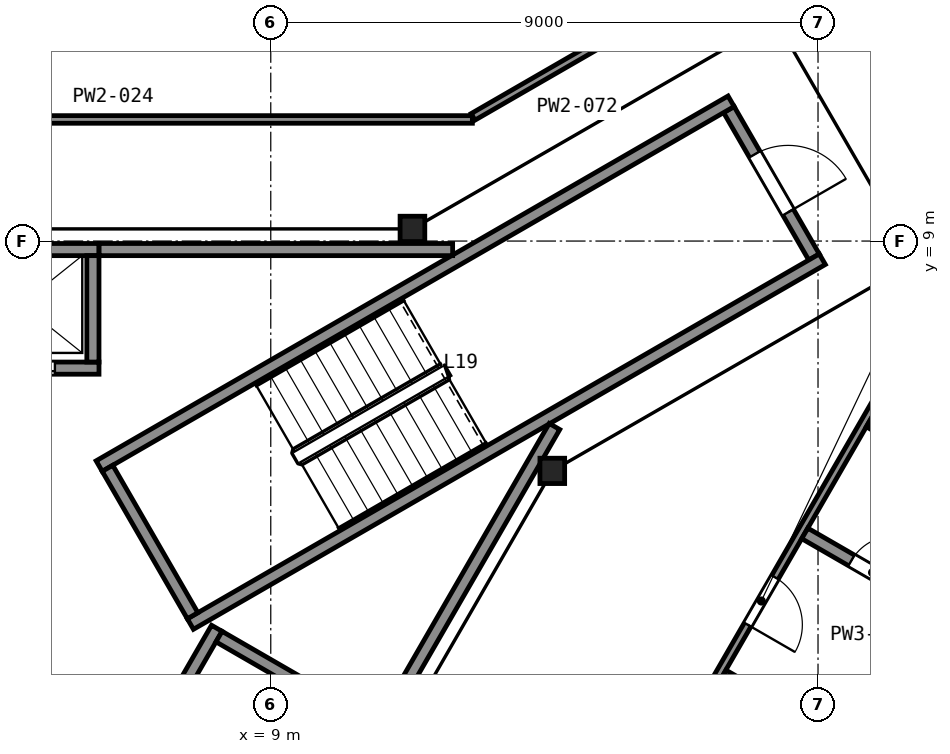
"""IFC4 building model, lengths in metres.
Left out: names, types, materials, properties, quantities, classifications, styles, units other than length and angle.
Written with IfcOpenShell. Run it as: python <this file> out.ifc"""

import sys

from ifc_helpers import new_model, si_unit, direction, frame, frame_2d, origin, origin_2d, place, context, subcontext, project, spatial, rectangle, i_section, extrude, element, fill, save


model = new_model("IFC4")
c1 = context("Model", 3, precision=1e-05, world=origin(), true_north=direction((0.0, 1.0)))
c2 = subcontext(c1, "Body", "Model", "MODEL_VIEW")
j1 = project(units=[si_unit("LENGTHUNIT", "METRE"), si_unit("PLANEANGLEUNIT", "RADIAN")], contexts=[c1])
p1 = place(None, origin())
s1 = spatial("IfcSite", under=j1, at=p1, CompositionType="ELEMENT")
p2 = place(p1, origin())
s2 = spatial("IfcBuilding", under=s1, at=p2, CompositionType="ELEMENT")
p3 = place(p2, frame((0.0, 0.0, 83.6)))
s3 = spatial("IfcBuildingStorey", under=s2, at=p3, CompositionType="ELEMENT", Elevation=83.6)
for number, where, z_axis, x_axis in (
    (1, (13.63, 5.22, 0.0), (0.0, 0.0, 1.0), (1.0, 0.0, 0.0)),
    (2, (11.33, 9.2, 0.0), (0.0, 0.0, 1.0), (1.0, 0.0, 0.0)),
):
    element("IfcColumn", number, at=place(p3, frame(where, z_axis=z_axis, x_axis=x_axis)), inside=s3, PredefinedType="COLUMN", context=c2, shape_type="SweptSolid", body=[
        extrude(i_section(OverallWidth=0.406, OverallDepth=0.417, WebThickness=0.03, FlangeThickness=0.048, FilletRadius=0.015, at=origin_2d()), origin(), (0.0, 0.0, 1.0), 3.6),
    ])
p4 = place(p3, frame((17.934, 8.738, 0.0), z_axis=(0.0, 0.0, 1.0), x_axis=(-0.49998411664, 0.866034573852, 0.0)))
e3 = element("IfcWall", 3, at=p4, inside=s3, PredefinedType="PARTITIONING", context=c2, shape_type="SweptSolid", body=[
    extrude(rectangle(XDim=2.8, YDim=0.2, at=frame_2d((1.4, 0.0))), origin(), (0.0, 0.0, 1.0), 3.35),
])
p5 = place(p4, frame((0.85, 0.0, 0.0)))
e4 = element("IfcOpeningElement", 4, at=p5, cuts=e3, PredefinedType="OPENING", context=c2, shape_type="SweptSolid", body=[
    extrude(rectangle(XDim=1.1, YDim=2.1, at=frame_2d((0.55, 1.05))), frame((0.0, 0.11, 0.0), z_axis=(0.0, -1.0, 0.0), x_axis=(1.0, 0.0, 0.0)), (0.0, 0.0, 1.0), 0.22),
])
for number, where, z_axis, x_axis in (
    (5, (6.178, 5.299, 0.0), (0.0, 0.0, 1.0), (0.866, 0.5, 0.0)),
    (6, (7.678, 2.701, 0.0), (0.0, 0.0, 1.0), (0.866, 0.5, 0.0)),
):
    element("IfcWall", number, at=place(p3, frame(where, z_axis=z_axis, x_axis=x_axis)), inside=s3, PredefinedType="PARTITIONING", context=c2, shape_type="SweptSolid", body=[
        extrude(rectangle(XDim=12.0, YDim=0.2, at=frame_2d((6.0, 0.0))), origin(), (0.0, 0.0, 1.0), 3.35),
    ])
p6 = place(p3, frame((7.715, 2.838, 0.0), z_axis=(0.0, 0.0, 1.0), x_axis=(-0.500049511043, 0.865996816683, 0.0)))
e7 = element("IfcWall", 7, at=p6, inside=s3, PredefinedType="PARTITIONING", context=c2, shape_type="SweptSolid", body=[
    extrude(rectangle(XDim=2.8, YDim=0.2, at=frame_2d((1.4, 0.0))), origin(), (0.0, 0.0, 1.0), 3.35),
])
p7 = place(p3, frame((3.625, 6.91, 0.0), z_axis=(0.0, 0.0, 1.0), x_axis=(1.0, 0.0, 0.0)))
e8 = element("IfcWall", 8, at=p7, inside=s3, PredefinedType="PARTITIONING", context=c2, shape_type="SweptSolid", body=[
    extrude(rectangle(XDim=2.55, YDim=0.2, at=frame_2d((1.275, 0.0))), origin(), (0.0, 0.0, 1.0), 3.6),
])
p8 = place(p7, frame((0.725, 0.0, 0.0)))
e9 = element("IfcOpeningElement", 9, at=p8, cuts=e8, PredefinedType="OPENING", context=c2, shape_type="SweptSolid", body=[
    extrude(rectangle(XDim=1.1, YDim=2.1, at=frame_2d((0.55, 1.05))), frame((0.0, 0.11, 0.0), z_axis=(0.0, -1.0, 0.0), x_axis=(1.0, 0.0, 0.0)), (0.0, 0.0, 1.0), 0.22),
])
p9 = place(p3, frame((3.625, 8.86, 0.0), z_axis=(0.0, 0.0, 1.0), x_axis=(1.0, 0.0, 0.0)))
e10 = element("IfcWall", 10, at=p9, inside=s3, PredefinedType="PARTITIONING", context=c2, shape_type="SweptSolid", body=[
    extrude(rectangle(XDim=2.55, YDim=0.2, at=frame_2d((1.275, 0.0))), origin(), (0.0, 0.0, 1.0), 3.6),
])
p10 = place(p3, frame((5.663, -1.612, 0.0), z_axis=(0.0, 0.0, 1.0), x_axis=(0.49998122708, 0.866036242063, 0.0)))
e11 = element("IfcWall", 11, at=p10, inside=s3, PredefinedType="PARTITIONING", context=c2, shape_type="SweptSolid", body=[
    extrude(rectangle(XDim=4.9, YDim=0.2, at=frame_2d((2.45, 0.0))), origin(), (0.0, 0.0, 1.0), 3.6),
])
p11 = place(p3, frame((6.075, 7.01, 0.0), z_axis=(0.0, 0.0, 1.0), x_axis=(0.0, 1.0, 0.0)))
e12 = element("IfcWall", 12, at=p11, inside=s3, PredefinedType="PARTITIONING", context=c2, shape_type="SweptSolid", body=[
    extrude(rectangle(XDim=1.75, YDim=0.2, at=frame_2d((0.875, 0.0))), origin(), (0.0, 0.0, 1.0), 3.6),
])
p12 = place(p3, frame((9.665, 1.62, 0.0), z_axis=(0.0, 0.0, 1.0), x_axis=(-0.866002029911, 0.500040482552, 0.0)))
e13 = element("IfcWall", 13, at=p12, inside=s3, PredefinedType="PARTITIONING", context=c2, shape_type="SweptSolid", body=[
    extrude(rectangle(XDim=1.75, YDim=0.2, at=frame_2d((0.875, 0.0))), origin(), (0.0, 0.0, 1.0), 3.6),
])
p13 = place(p3, frame((6.177, 8.86, 0.0), z_axis=(0.0, 0.0, 1.0), x_axis=(1.0, 0.0, 0.0)))
e14 = element("IfcWall", 14, at=p13, inside=s3, PredefinedType="PARTITIONING", context=c2, shape_type="SweptSolid", body=[
    extrude(rectangle(XDim=5.814, YDim=0.2, at=frame_2d((2.907, 0.0))), origin(), (0.0, 0.0, 1.0), 3.35),
])
p14 = place(p3, frame((8.492, -3.012, 0.0), z_axis=(0.0, 0.0, 1.0), x_axis=(0.499972957231, 0.866041016371, 0.0)))
e15 = element("IfcWall", 15, at=p14, inside=s3, PredefinedType="PARTITIONING", context=c2, shape_type="SweptSolid", body=[
    extrude(rectangle(XDim=10.349, YDim=0.2, at=frame_2d((5.174, 0.0))), origin(), (0.0, 0.0, 1.0), 3.35),
])
p15 = place(p3, frame((-12.315, 11.0, 0.0), z_axis=(0.0, 0.0, 1.0), x_axis=(1.0, 0.0, 0.0)))
e16 = element("IfcWall", 16, at=p15, inside=s3, PredefinedType="PARTITIONING", context=c2, shape_type="SweptSolid", body=[
    extrude(rectangle(XDim=24.631, YDim=0.125, at=frame_2d((12.315, 0.0))), origin(), (0.0, 0.0, 1.0), 2.262),
])
p16 = place(p15, frame((11.812, 0.0, 0.0)))
e17 = element("IfcOpeningElement", 17, at=p16, cuts=e16, PredefinedType="OPENING", context=c2, shape_type="SweptSolid", body=[
    extrude(rectangle(XDim=1.0, YDim=2.1, at=frame_2d((0.5, 1.05))), frame((0.0, 0.073, 0.0), z_axis=(0.0, -1.0, 0.0), x_axis=(1.0, 0.0, 0.0)), (0.0, 0.0, 1.0), 0.145),
])
p17 = place(p3, frame((19.456, 7.217, 0.0), z_axis=(0.0, 0.0, 1.0), x_axis=(-0.50002170027, -0.866012874765, 0.0)))
e18 = element("IfcWall", 18, at=p17, inside=s3, PredefinedType="PARTITIONING", context=c2, shape_type="SweptSolid", body=[
    extrude(rectangle(XDim=31.379, YDim=0.125, at=frame_2d((15.69, 0.0))), origin(), (0.0, 0.0, 1.0), 2.262),
])
p18 = place(p17, frame((26.843, 0.0, 0.0)))
e19 = element("IfcOpeningElement", 19, at=p18, cuts=e18, PredefinedType="OPENING", context=c2, shape_type="SweptSolid", body=[
    extrude(rectangle(XDim=1.0, YDim=2.1, at=frame_2d((0.5, 1.05))), frame((0.0, 0.073, 0.0), z_axis=(0.0, -1.0, 0.0), x_axis=(1.0, 0.0, 0.0)), (0.0, 0.0, 1.0), 0.145),
])
p19 = place(p17, frame((24.03, 0.0, 0.0)))
e20 = element("IfcOpeningElement", 20, at=p19, cuts=e18, PredefinedType="OPENING", context=c2, shape_type="SweptSolid", body=[
    extrude(rectangle(XDim=0.9, YDim=2.1, at=frame_2d((0.45, 1.05))), frame((0.0, 0.073, 0.0), z_axis=(0.0, -1.0, 0.0), x_axis=(1.0, 0.0, 0.0)), (0.0, 0.0, 1.0), 0.145),
])
p20 = place(p17, frame((17.159, 0.0, 0.0)))
e21 = element("IfcOpeningElement", 21, at=p20, cuts=e18, PredefinedType="OPENING", context=c2, shape_type="SweptSolid", body=[
    extrude(rectangle(XDim=0.9, YDim=2.1, at=frame_2d((0.45, 1.05))), frame((0.0, 0.073, 0.0), z_axis=(0.0, -1.0, 0.0), x_axis=(1.0, 0.0, 0.0)), (0.0, 0.0, 1.0), 0.145),
])
p21 = place(p17, frame((14.24, 0.0, 0.0)))
e22 = element("IfcOpeningElement", 22, at=p21, cuts=e18, PredefinedType="OPENING", context=c2, shape_type="SweptSolid", body=[
    extrude(rectangle(XDim=0.9, YDim=2.1, at=frame_2d((0.45, 1.05))), frame((0.0, 0.073, 0.0), z_axis=(0.0, -1.0, 0.0), x_axis=(1.0, 0.0, 0.0)), (0.0, 0.0, 1.0), 0.145),
])
p22 = place(p17, frame((6.997, 0.0, 0.0)))
e23 = element("IfcOpeningElement", 23, at=p22, cuts=e18, PredefinedType="OPENING", context=c2, shape_type="SweptSolid", body=[
    extrude(rectangle(XDim=0.9, YDim=2.1, at=frame_2d((0.45, 1.05))), frame((0.0, 0.073, 0.0), z_axis=(0.0, -1.0, 0.0), x_axis=(1.0, 0.0, 0.0)), (0.0, 0.0, 1.0), 0.145),
])
p23 = place(p17, frame((4.327, 0.0, 0.0)))
e24 = element("IfcOpeningElement", 24, at=p23, cuts=e18, PredefinedType="OPENING", context=c2, shape_type="SweptSolid", body=[
    extrude(rectangle(XDim=0.9, YDim=2.1, at=frame_2d((0.45, 1.05))), frame((0.0, 0.073, 0.0), z_axis=(0.0, -1.0, 0.0), x_axis=(1.0, 0.0, 0.0)), (0.0, 0.0, 1.0), 0.145),
])
p24 = place(p3, frame((12.327, 11.042, 0.0), z_axis=(0.0, 0.0, 1.0), x_axis=(0.866063239147, 0.499934461503, 0.0)))
e25 = element("IfcWall", 25, at=p24, inside=s3, PredefinedType="PARTITIONING", context=c2, shape_type="SweptSolid", body=[
    extrude(rectangle(XDim=2.359, YDim=0.125, at=frame_2d((1.18, 0.0))), origin(), (0.0, 0.0, 1.0), 2.262),
])
p25 = place(p3, frame((16.45, 1.877, 0.0), z_axis=(0.0, 0.0, 1.0), x_axis=(0.866052736899, -0.499952654668, 0.0)))
e26 = element("IfcWall", 26, at=p25, inside=s3, PredefinedType="PARTITIONING", context=c2, shape_type="SweptSolid", body=[
    extrude(rectangle(XDim=7.987, YDim=0.15, at=frame_2d((3.994, 0.0))), origin(), (0.0, 0.0, 1.0), 2.262),
])
p26 = place(p3, frame((17.782, 4.192, 0.0), z_axis=(0.0, 0.0, 1.0), x_axis=(0.866005850709, -0.50003386539, 0.0)))
e27 = element("IfcWall", 27, at=p26, inside=s3, PredefinedType="PARTITIONING", context=c2, shape_type="SweptSolid", body=[
    extrude(rectangle(XDim=2.737, YDim=0.2, at=frame_2d((1.369, 0.0))), origin(), (0.0, 0.0, 1.0), 2.262),
])
p27 = place(p26, frame((0.887, 0.0, 0.0)))
e28 = element("IfcOpeningElement", 28, at=p27, cuts=e27, PredefinedType="OPENING", context=c2, shape_type="SweptSolid", body=[
    extrude(rectangle(XDim=0.8, YDim=2.1, at=frame_2d((0.4, 1.05))), frame((0.0, 0.11, 0.0), z_axis=(0.0, -1.0, 0.0), x_axis=(1.0, 0.0, 0.0)), (0.0, 0.0, 1.0), 0.22),
])
p28 = place(p3, frame((18.832, 6.011, 0.0), z_axis=(0.0, 0.0, 1.0), x_axis=(0.866027362729, -0.499996606993, 0.0)))
e29 = element("IfcWall", 29, at=p28, inside=s3, PredefinedType="PARTITIONING", context=c2, shape_type="SweptSolid", body=[
    extrude(rectangle(XDim=7.991, YDim=0.15, at=frame_2d((3.996, 0.0))), origin(), (0.0, 0.0, 1.0), 2.262),
])
p29 = place(p5, origin())
e30 = element("IfcDoor", 30, at=p29, inside=s3, OperationType="SINGLE_SWING_LEFT", PredefinedType="DOOR", context=c2, shape_type="SweptSolid", body=[
    extrude(rectangle(XDim=1.1, YDim=2.1, at=frame_2d((0.55, 1.05))), frame((0.0, 0.025, 0.0), z_axis=(0.0, -1.0, 0.0), x_axis=(1.0, 0.0, 0.0)), (0.0, 0.0, 1.0), 0.05),
])
fill(e4, e30)
p30 = place(p8, origin())
e31 = element("IfcDoor", 31, at=p30, inside=s3, OperationType="SLIDING_TO_LEFT", PredefinedType="DOOR", context=c2, shape_type="SweptSolid", body=[
    extrude(rectangle(XDim=1.1, YDim=2.1, at=frame_2d((0.55, 1.05))), frame((0.0, 0.025, 0.0), z_axis=(0.0, -1.0, 0.0), x_axis=(1.0, 0.0, 0.0)), (0.0, 0.0, 1.0), 0.05),
])
fill(e9, e31)
p31 = place(p23, origin())
e32 = element("IfcDoor", 32, at=p31, inside=s3, OperationType="SINGLE_SWING_RIGHT", PredefinedType="DOOR", context=c2, shape_type="SweptSolid", body=[
    extrude(rectangle(XDim=0.9, YDim=2.1, at=frame_2d((0.45, 1.05))), frame((0.0, 0.025, 0.0), z_axis=(0.0, -1.0, 0.0), x_axis=(1.0, 0.0, 0.0)), (0.0, 0.0, 1.0), 0.05),
])
fill(e24, e32)
p32 = place(p27, origin())
e33 = element("IfcDoor", 33, at=p32, inside=s3, OperationType="SINGLE_SWING_RIGHT", PredefinedType="DOOR", context=c2, shape_type="SweptSolid", body=[
    extrude(rectangle(XDim=0.8, YDim=2.1, at=frame_2d((0.4, 1.05))), frame((0.0, 0.025, 0.0), z_axis=(0.0, -1.0, 0.0), x_axis=(1.0, 0.0, 0.0)), (0.0, 0.0, 1.0), 0.05),
])
fill(e28, e33)
save(model, sys.argv[1])
